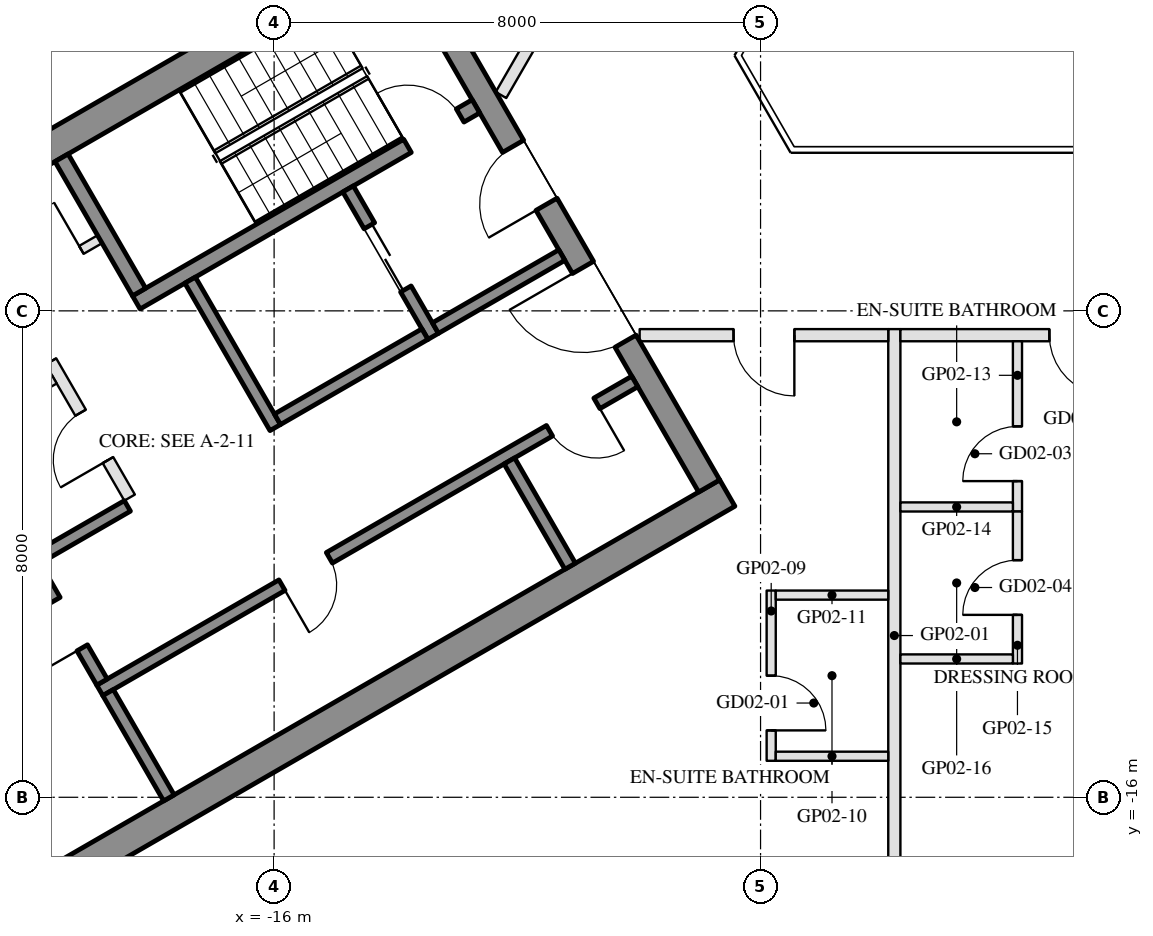
"""IFC4 building model, lengths in metres.
Left out: names, types, materials, properties, quantities, classifications, styles, units other than length and angle.
Written with IfcOpenShell. Run it as: python <this file> out.ifc"""

import sys

from ifc_helpers import new_model, si_unit, direction, frame, frame_2d, origin, place, context, subcontext, project, spatial, rectangle, extrude, element, fill, save


model = new_model("IFC4")
c1 = context("Model", 3, precision=1e-05, world=origin(), true_north=direction((0.0, 1.0)))
c2 = subcontext(c1, "Body", "Model", "MODEL_VIEW")
j1 = project(units=[si_unit("LENGTHUNIT", "METRE"), si_unit("PLANEANGLEUNIT", "RADIAN")], contexts=[c1])
p1 = place(None, origin())
s1 = spatial("IfcSite", under=j1, at=p1, CompositionType="ELEMENT")
p2 = place(p1, origin())
s2 = spatial("IfcBuilding", under=s1, at=p2, CompositionType="ELEMENT")
p3 = place(p2, frame((0.0, 0.0, 53.9)))
s3 = spatial("IfcBuildingStorey", under=s2, at=p3, CompositionType="ELEMENT", Elevation=53.9)
for number, where, z_axis, x_axis in (
    (1, (-13.797, -1.903, 0.0), (0.0, 0.0, 1.0), (-0.866, -0.5, 0.0)),
    (2, (-8.547, -10.997, 0.0), (0.0, 0.0, 1.0), (-0.866, -0.5, 0.0)),
):
    element("IfcWall", number, at=place(p3, frame(where, z_axis=z_axis, x_axis=x_axis)), inside=s3, PredefinedType="SHEAR", context=c2, shape_type="SweptSolid", body=[
        extrude(rectangle(XDim=14.837, YDim=0.5, at=frame_2d((7.418, 0.0))), origin(), (0.0, 0.0, 1.0), 3.5),
    ])
p4 = place(p3, frame((-13.845, -2.22, 0.0), z_axis=(0.0, 0.0, 1.0), x_axis=(0.500004234368, -0.866022959057, 0.0)))
e3 = element("IfcWall", 3, at=p4, inside=s3, PredefinedType="SHEAR", context=c2, shape_type="SweptSolid", body=[
    extrude(rectangle(XDim=10.0, YDim=0.4, at=frame_2d((5.0, 0.0))), origin(), (0.0, 0.0, 1.0), 3.5),
])
p5 = place(p4, frame((3.55, 0.0, 0.0)))
e4 = element("IfcOpeningElement", 4, at=p5, cuts=e3, PredefinedType="OPENING", context=c2, shape_type="SweptSolid", body=[
    extrude(rectangle(XDim=1.1, YDim=2.1, at=frame_2d((0.55, 1.05))), frame((0.0, 0.21, 0.0), z_axis=(0.0, -1.0, 0.0), x_axis=(1.0, 0.0, 0.0)), (0.0, 0.0, 1.0), 0.42),
])
p6 = place(p4, frame((5.85, 0.0, 0.0)))
e5 = element("IfcOpeningElement", 5, at=p6, cuts=e3, PredefinedType="OPENING", context=c2, shape_type="SweptSolid", body=[
    extrude(rectangle(XDim=1.4, YDim=2.1, at=frame_2d((0.7, 1.05))), frame((0.0, 0.21, 0.0), z_axis=(0.0, -1.0, 0.0), x_axis=(1.0, 0.0, 0.0)), (0.0, 0.0, 1.0), 0.42),
])
p7 = place(p3, frame((-12.681, -4.636, 0.0), z_axis=(0.0, 0.0, 1.0), x_axis=(-0.866021702275, -0.500006411147, 0.0)))
e6 = element("IfcWall", 6, at=p7, inside=s3, PredefinedType="SHEAR", context=c2, shape_type="SweptSolid", body=[
    extrude(rectangle(XDim=6.45, YDim=0.25, at=frame_2d((3.225, 0.0))), origin(), (0.0, 0.0, 1.0), 3.5),
])
p8 = place(p7, frame((0.3, 0.0, 0.0)))
e7 = element("IfcOpeningElement", 7, at=p8, cuts=e6, PredefinedType="OPENING", context=c2, shape_type="SweptSolid", body=[
    extrude(rectangle(XDim=1.0, YDim=2.1, at=frame_2d((0.5, 1.05))), frame((0.0, 0.135, 0.0), z_axis=(0.0, -1.0, 0.0), x_axis=(1.0, 0.0, 0.0)), (0.0, 0.0, 1.0), 0.27),
])
p9 = place(p3, frame((-19.496, -5.482, 0.0), z_axis=(0.0, 0.0, 1.0), x_axis=(0.499990435942, -0.866030925526, 0.0)))
e8 = element("IfcWall", 8, at=p9, inside=s3, PredefinedType="SHEAR", context=c2, shape_type="SweptSolid", body=[
    extrude(rectangle(XDim=2.55, YDim=0.25, at=frame_2d((1.275, 0.0))), origin(), (0.0, 0.0, 1.0), 3.5),
])
p10 = place(p3, frame((-17.381, -7.495, 0.0), z_axis=(0.0, 0.0, 1.0), x_axis=(0.500011755427, -0.866018616679, 0.0)))
e9 = element("IfcWall", 9, at=p10, inside=s3, PredefinedType="SHEAR", context=c2, shape_type="SweptSolid", body=[
    extrude(rectangle(XDim=2.8, YDim=0.2, at=frame_2d((1.4, 0.0))), origin(), (0.0, 0.0, 1.0), 3.5),
])
p11 = place(p3, frame((-14.783, -5.995, 0.0), z_axis=(0.0, 0.0, 1.0), x_axis=(0.49994636267, -0.866056369097, 0.0)))
e10 = element("IfcWall", 10, at=p11, inside=s3, PredefinedType="SHEAR", context=c2, shape_type="SweptSolid", body=[
    extrude(rectangle(XDim=2.8, YDim=0.2, at=frame_2d((1.4, 0.0))), origin(), (0.0, 0.0, 1.0), 3.5),
])
p12 = place(p11, frame((0.7, 0.0, 0.0)))
e11 = element("IfcOpeningElement", 11, at=p12, cuts=e10, PredefinedType="OPENING", context=c2, shape_type="SweptSolid", body=[
    extrude(rectangle(XDim=1.2, YDim=2.1, at=frame_2d((0.6, 1.05))), frame((0.0, 0.11, 0.0), z_axis=(0.0, -1.0, 0.0), x_axis=(1.0, 0.0, 0.0)), (0.0, 0.0, 1.0), 0.22),
])
p13 = place(p3, frame((-13.52, -8.383, 0.0), z_axis=(0.0, 0.0, 1.0), x_axis=(-0.866034573852, -0.49998411664, 0.0)))
e12 = element("IfcWall", 12, at=p13, inside=s3, PredefinedType="SHEAR", context=c2, shape_type="SweptSolid", body=[
    extrude(rectangle(XDim=2.8, YDim=0.2, at=frame_2d((1.4, 0.0))), origin(), (0.0, 0.0, 1.0), 3.5),
])
p14 = place(p3, frame((-11.268, -7.083, 0.0), z_axis=(0.0, 0.0, 1.0), x_axis=(-0.866050077142, -0.499957262057, 0.0)))
e13 = element("IfcWall", 13, at=p14, inside=s3, PredefinedType="SHEAR", context=c2, shape_type="SweptSolid", body=[
    extrude(rectangle(XDim=2.4, YDim=0.2, at=frame_2d((1.2, 0.0))), origin(), (0.0, 0.0, 1.0), 3.5),
])
p15 = place(p3, frame((-10.068, -9.162, 0.0), z_axis=(0.0, 0.0, 1.0), x_axis=(-0.866032725843, -0.499987317609, 0.0)))
e14 = element("IfcWall", 14, at=p15, inside=s3, PredefinedType="SHEAR", context=c2, shape_type="SweptSolid", body=[
    extrude(rectangle(XDim=10.16, YDim=0.2, at=frame_2d((5.08, 0.0))), origin(), (0.0, 0.0, 1.0), 3.5),
])
p16 = place(p15, frame((0.72, 0.0, 0.0)))
e15 = element("IfcOpeningElement", 15, at=p16, cuts=e14, PredefinedType="OPENING", context=c2, shape_type="SweptSolid", body=[
    extrude(rectangle(XDim=0.9, YDim=2.1, at=frame_2d((0.45, 1.05))), frame((0.0, 0.11, 0.0), z_axis=(0.0, -1.0, 0.0), x_axis=(1.0, 0.0, 0.0)), (0.0, 0.0, 1.0), 0.22),
])
p17 = place(p15, frame((5.8, 0.0, 0.0)))
e16 = element("IfcOpeningElement", 16, at=p17, cuts=e14, PredefinedType="OPENING", context=c2, shape_type="SweptSolid", body=[
    extrude(rectangle(XDim=0.9, YDim=2.1, at=frame_2d((0.45, 1.05))), frame((0.0, 0.11, 0.0), z_axis=(0.0, -1.0, 0.0), x_axis=(1.0, 0.0, 0.0)), (0.0, 0.0, 1.0), 0.22),
])
p18 = place(p3, frame((-20.031, -12.026, 0.0), z_axis=(0.0, 0.0, 1.0), x_axis=(0.500033551112, -0.866006032174, 0.0)))
e17 = element("IfcWall", 17, at=p18, inside=s3, PredefinedType="SHEAR", context=c2, shape_type="SweptSolid", body=[
    extrude(rectangle(XDim=2.4, YDim=0.2, at=frame_2d((1.2, 0.0))), origin(), (0.0, 0.0, 1.0), 3.5),
])
p19 = place(p18, frame((0.85, 0.0, 0.0)))
e18 = element("IfcOpeningElement", 18, at=p19, cuts=e17, PredefinedType="OPENING", context=c2, shape_type="SweptSolid", body=[
    extrude(rectangle(XDim=0.9, YDim=2.1, at=frame_2d((0.45, 1.05))), frame((0.0, 0.11, 0.0), z_axis=(0.0, -1.0, 0.0), x_axis=(1.0, 0.0, 0.0)), (0.0, 0.0, 1.0), 0.22),
])
p20 = place(p3, frame((-18.413, -11.208, 0.0), z_axis=(0.0, 0.0, 1.0), x_axis=(-0.866038183914, -0.499977863513, 0.0)))
e19 = element("IfcWall", 19, at=p20, inside=s3, PredefinedType="SHEAR", context=c2, shape_type="SweptSolid", body=[
    extrude(rectangle(XDim=1.71, YDim=0.2, at=frame_2d((0.855, 0.0))), origin(), (0.0, 0.0, 1.0), 3.5),
])
for number, where, z_axis, x_axis in (
    (20, (-12.131, -10.468, 0.0), (0.0, 0.0, 1.0), (0.5, -0.866, 0.0)),
    (21, (-18.73, -14.278, 0.0), (0.0, 0.0, 1.0), (0.5, -0.866, 0.0)),
):
    element("IfcWall", number, at=place(p3, frame(where, z_axis=z_axis, x_axis=x_axis)), inside=s3, PredefinedType="SHEAR", context=c2, shape_type="SweptSolid", body=[
        extrude(rectangle(XDim=2.0, YDim=0.2, at=frame_2d((1.0, 0.0))), origin(), (0.0, 0.0, 1.0), 3.5),
    ])
p21 = place(p3, frame((-21.076, -6.395, 0.0), z_axis=(0.0, 0.0, 1.0), x_axis=(0.50001468107, -0.866016927499, 0.0)))
e22 = element("IfcWall", 22, at=p21, inside=s3, PredefinedType="PARTITIONING", context=c2, shape_type="SweptSolid", body=[
    extrude(rectangle(XDim=5.4, YDim=0.2, at=frame_2d((2.7, 0.0))), origin(), (0.0, 0.0, 1.0), 3.5),
])
p22 = place(p21, frame((1.913, 0.0, 0.0)))
e23 = element("IfcOpeningElement", 23, at=p22, cuts=e22, PredefinedType="OPENING", context=c2, shape_type="SweptSolid", body=[
    extrude(rectangle(XDim=0.9, YDim=2.1, at=frame_2d((0.45, 1.05))), frame((0.0, 0.11, 0.0), z_axis=(0.0, -1.0, 0.0), x_axis=(1.0, 0.0, 0.0)), (0.0, 0.0, 1.0), 0.22),
])
p23 = place(p21, frame((3.788, 0.0, 0.0)))
e24 = element("IfcOpeningElement", 24, at=p23, cuts=e22, PredefinedType="OPENING", context=c2, shape_type="SweptSolid", body=[
    extrude(rectangle(XDim=0.9, YDim=2.1, at=frame_2d((0.45, 1.05))), frame((0.0, 0.11, 0.0), z_axis=(0.0, -1.0, 0.0), x_axis=(1.0, 0.0, 0.0)), (0.0, 0.0, 1.0), 0.22),
])
p24 = place(p3, frame((-18.866, -6.822, 0.0), z_axis=(0.0, 0.0, 1.0), x_axis=(-0.866028054938, -0.499995408039, 0.0)))
e25 = element("IfcWall", 25, at=p24, inside=s3, PredefinedType="PARTITIONING", context=c2, shape_type="SweptSolid", body=[
    extrude(rectangle(XDim=1.6, YDim=0.15, at=frame_2d((0.8, 0.0))), origin(), (0.0, 0.0, 1.0), 3.5),
])
p25 = place(p24, frame((0.35, 0.0, 0.0)))
e26 = element("IfcOpeningElement", 26, at=p25, cuts=e25, PredefinedType="OPENING", context=c2, shape_type="SweptSolid", body=[
    extrude(rectangle(XDim=0.9, YDim=2.1, at=frame_2d((0.45, 1.05))), frame((0.0, 0.085, 0.0), z_axis=(0.0, -1.0, 0.0), x_axis=(1.0, 0.0, 0.0)), (0.0, 0.0, 1.0), 0.17),
])
p26 = place(p3, frame((-19.613, -9.13, 0.0), z_axis=(0.0, 0.0, 1.0), x_axis=(-0.866031734426, -0.499989034847, 0.0)))
e27 = element("IfcWall", 27, at=p26, inside=s3, PredefinedType="PARTITIONING", context=c2, shape_type="SweptSolid", body=[
    extrude(rectangle(XDim=6.95, YDim=0.15, at=frame_2d((3.475, 0.0))), origin(), (0.0, 0.0, 1.0), 3.5),
])
p27 = place(p3, frame((-5.8, -18.38, 0.0), z_axis=(0.0, 0.0, 1.0), x_axis=(0.0, 1.0, 0.0)))
e28 = element("IfcWall", 28, at=p27, inside=s3, PredefinedType="PARTITIONING", context=c2, shape_type="SweptSolid", body=[
    extrude(rectangle(XDim=10.08, YDim=0.2, at=frame_2d((5.04, 0.0))), origin(), (0.0, 0.0, 1.0), 2.96),
])
p28 = place(p3, frame((-5.9, -8.4, 0.0), z_axis=(0.0, 0.0, 1.0), x_axis=(-1.0, 0.0, 0.0)))
e29 = element("IfcWall", 29, at=p28, inside=s3, PredefinedType="PARTITIONING", context=c2, shape_type="SweptSolid", body=[
    extrude(rectangle(XDim=4.088, YDim=0.2, at=frame_2d((2.044, 0.0))), origin(), (0.0, 0.0, 1.0), 2.95),
])
p29 = place(p28, frame((1.544, 0.0, 0.0)))
e30 = element("IfcOpeningElement", 30, at=p29, cuts=e29, PredefinedType="OPENING", context=c2, shape_type="SweptSolid", body=[
    extrude(rectangle(XDim=1.0, YDim=2.1, at=frame_2d((0.5, 1.05))), frame((0.0, 0.11, 0.0), z_axis=(0.0, -1.0, 0.0), x_axis=(1.0, 0.0, 0.0)), (0.0, 0.0, 1.0), 0.22),
])
p30 = place(p3, frame((-7.825, -12.6, 0.0), z_axis=(0.0, 0.0, 1.0), x_axis=(0.0, -1.0, 0.0)))
e31 = element("IfcWall", 31, at=p30, inside=s3, PredefinedType="PARTITIONING", context=c2, shape_type="SweptSolid", body=[
    extrude(rectangle(XDim=2.8, YDim=0.15, at=frame_2d((1.4, 0.0))), origin(), (0.0, 0.0, 1.0), 2.95),
])
p31 = place(p30, frame((1.4, 0.0, 0.0)))
e32 = element("IfcOpeningElement", 32, at=p31, cuts=e31, PredefinedType="OPENING", context=c2, shape_type="SweptSolid", body=[
    extrude(rectangle(XDim=0.9, YDim=2.1, at=frame_2d((0.45, 1.05))), frame((0.0, 0.085, 0.0), z_axis=(0.0, -1.0, 0.0), x_axis=(1.0, 0.0, 0.0)), (0.0, 0.0, 1.0), 0.17),
])
for number, where, z_axis, x_axis in (
    (33, (-7.75, -15.325, 0.0), (0.0, 0.0, 1.0), (1.0, 0.0, 0.0)),
    (34, (-7.75, -12.675, 0.0), (0.0, 0.0, 1.0), (1.0, 0.0, 0.0)),
):
    element("IfcWall", number, at=place(p3, frame(where, z_axis=z_axis, x_axis=x_axis)), inside=s3, PredefinedType="PARTITIONING", context=c2, shape_type="SweptSolid", body=[
        extrude(rectangle(XDim=1.85, YDim=0.15, at=frame_2d((0.925, 0.0))), origin(), (0.0, 0.0, 1.0), 3.55),
    ])
p32 = place(p3, frame((2.8, -8.4, 0.0), z_axis=(0.0, 0.0, 1.0), x_axis=(-1.0, 0.0, 0.0)))
e35 = element("IfcWall", 35, at=p32, inside=s3, PredefinedType="PARTITIONING", context=c2, shape_type="SweptSolid", body=[
    extrude(rectangle(XDim=8.5, YDim=0.2, at=frame_2d((4.25, 0.0))), origin(), (0.0, 0.0, 1.0), 2.95),
])
p33 = place(p32, frame((5.05, 0.0, 0.0)))
e36 = element("IfcOpeningElement", 36, at=p33, cuts=e35, PredefinedType="OPENING", context=c2, shape_type="SweptSolid", body=[
    extrude(rectangle(XDim=1.0, YDim=2.1, at=frame_2d((0.5, 1.05))), frame((0.0, 0.11, 0.0), z_axis=(0.0, -1.0, 0.0), x_axis=(1.0, 0.0, 0.0)), (0.0, 0.0, 1.0), 0.22),
])
p34 = place(p3, frame((-3.775, -11.3, 0.0), z_axis=(0.0, 0.0, 1.0), x_axis=(0.0, 1.0, 0.0)))
e37 = element("IfcWall", 37, at=p34, inside=s3, PredefinedType="PARTITIONING", context=c2, shape_type="SweptSolid", body=[
    extrude(rectangle(XDim=2.8, YDim=0.15, at=frame_2d((1.4, 0.0))), origin(), (0.0, 0.0, 1.0), 2.95),
])
p35 = place(p34, frame((0.5, 0.0, 0.0)))
e38 = element("IfcOpeningElement", 38, at=p35, cuts=e37, PredefinedType="OPENING", context=c2, shape_type="SweptSolid", body=[
    extrude(rectangle(XDim=0.9, YDim=2.1, at=frame_2d((0.45, 1.05))), frame((0.0, 0.085, 0.0), z_axis=(0.0, -1.0, 0.0), x_axis=(1.0, 0.0, 0.0)), (0.0, 0.0, 1.0), 0.17),
])
p36 = place(p3, frame((-5.7, -11.225, 0.0), z_axis=(0.0, 0.0, 1.0), x_axis=(1.0, 0.0, 0.0)))
e39 = element("IfcWall", 39, at=p36, inside=s3, PredefinedType="PARTITIONING", context=c2, shape_type="SweptSolid", body=[
    extrude(rectangle(XDim=1.85, YDim=0.15, at=frame_2d((0.925, 0.0))), origin(), (0.0, 0.0, 1.0), 2.95),
])
p37 = place(p3, frame((-3.775, -13.8, 0.0), z_axis=(0.0, 0.0, 1.0), x_axis=(0.0, 1.0, 0.0)))
e40 = element("IfcWall", 40, at=p37, inside=s3, PredefinedType="PARTITIONING", context=c2, shape_type="SweptSolid", body=[
    extrude(rectangle(XDim=2.5, YDim=0.15, at=frame_2d((1.25, 0.0))), origin(), (0.0, 0.0, 1.0), 2.95),
])
p38 = place(p37, frame((0.8, 0.0, 0.0)))
e41 = element("IfcOpeningElement", 41, at=p38, cuts=e40, PredefinedType="OPENING", context=c2, shape_type="SweptSolid", body=[
    extrude(rectangle(XDim=0.9, YDim=2.1, at=frame_2d((0.45, 1.05))), frame((0.0, 0.085, 0.0), z_axis=(0.0, -1.0, 0.0), x_axis=(1.0, 0.0, 0.0)), (0.0, 0.0, 1.0), 0.17),
])
p39 = place(p3, frame((-5.7, -13.725, 0.0), z_axis=(0.0, 0.0, 1.0), x_axis=(1.0, 0.0, 0.0)))
e42 = element("IfcWall", 42, at=p39, inside=s3, PredefinedType="PARTITIONING", context=c2, shape_type="SweptSolid", body=[
    extrude(rectangle(XDim=1.85, YDim=0.15, at=frame_2d((0.925, 0.0))), origin(), (0.0, 0.0, 1.0), 2.95),
])
p40 = place(p3, frame((-12.269, -4.45, 0.0), z_axis=(0.0, 0.0, 1.0), x_axis=(0.500021044785, 0.866013253231, 0.0)))
e43 = element("IfcWall", 43, at=p40, inside=s3, PredefinedType="PARTITIONING", context=c2, shape_type="SweptSolid", body=[
    extrude(rectangle(XDim=4.884, YDim=0.2, at=frame_2d((2.442, 0.0))), origin(), (0.0, 0.0, 1.0), 2.95),
])
p41 = place(p40, frame((1.942, 0.0, 0.0)))
e44 = element("IfcOpeningElement", 44, at=p41, cuts=e43, PredefinedType="OPENING", context=c2, shape_type="SweptSolid", body=[
    extrude(rectangle(XDim=1.0, YDim=2.1, at=frame_2d((0.5, 1.05))), frame((0.0, 0.11, 0.0), z_axis=(0.0, -1.0, 0.0), x_axis=(1.0, 0.0, 0.0)), (0.0, 0.0, 1.0), 0.22),
])
p42 = place(p12, origin())
e45 = element("IfcDoor", 45, at=p42, inside=s3, OperationType="DOUBLE_DOOR_SLIDING", PredefinedType="DOOR", context=c2, shape_type="SweptSolid", body=[
    extrude(rectangle(XDim=1.2, YDim=2.1, at=frame_2d((0.6, 1.05))), frame((0.0, 0.025, 0.0), z_axis=(0.0, -1.0, 0.0), x_axis=(1.0, 0.0, 0.0)), (0.0, 0.0, 1.0), 0.05),
])
fill(e11, e45)
p43 = place(p25, frame((0.9, 0.0, 0.0), z_axis=(0.0, 0.0, 1.0), x_axis=(-1.0, 0.0, 0.0)))
e46 = element("IfcDoor", 46, at=p43, inside=s3, OperationType="SINGLE_SWING_RIGHT", PredefinedType="DOOR", context=c2, shape_type="SweptSolid", body=[
    extrude(rectangle(XDim=0.9, YDim=2.1, at=frame_2d((0.45, 1.05))), frame((0.0, 0.025, 0.0), z_axis=(0.0, -1.0, 0.0), x_axis=(1.0, 0.0, 0.0)), (0.0, 0.0, 1.0), 0.05),
])
fill(e26, e46)
p44 = place(p16, origin())
e47 = element("IfcDoor", 47, at=p44, inside=s3, OperationType="SINGLE_SWING_LEFT", PredefinedType="DOOR", context=c2, shape_type="SweptSolid", body=[
    extrude(rectangle(XDim=0.9, YDim=2.1, at=frame_2d((0.45, 1.05))), frame((0.0, 0.025, 0.0), z_axis=(0.0, -1.0, 0.0), x_axis=(1.0, 0.0, 0.0)), (0.0, 0.0, 1.0), 0.05),
])
fill(e15, e47)
p45 = place(p17, origin())
e48 = element("IfcDoor", 48, at=p45, inside=s3, OperationType="SINGLE_SWING_RIGHT", PredefinedType="DOOR", context=c2, shape_type="SweptSolid", body=[
    extrude(rectangle(XDim=0.9, YDim=2.1, at=frame_2d((0.45, 1.05))), frame((0.0, 0.025, 0.0), z_axis=(0.0, -1.0, 0.0), x_axis=(1.0, 0.0, 0.0)), (0.0, 0.0, 1.0), 0.05),
])
fill(e16, e48)
p46 = place(p19, frame((0.9, 0.0, 0.0), z_axis=(0.0, 0.0, 1.0), x_axis=(-1.0, 0.0, 0.0)))
e49 = element("IfcDoor", 49, at=p46, inside=s3, OperationType="SINGLE_SWING_LEFT", PredefinedType="DOOR", context=c2, shape_type="SweptSolid", body=[
    extrude(rectangle(XDim=0.9, YDim=2.1, at=frame_2d((0.45, 1.05))), frame((0.0, 0.025, 0.0), z_axis=(0.0, -1.0, 0.0), x_axis=(1.0, 0.0, 0.0)), (0.0, 0.0, 1.0), 0.05),
])
fill(e18, e49)
p47 = place(p23, frame((0.9, 0.0, 0.0), z_axis=(0.0, 0.0, 1.0), x_axis=(-1.0, 0.0, 0.0)))
e50 = element("IfcDoor", 50, at=p47, inside=s3, OperationType="SINGLE_SWING_LEFT", PredefinedType="DOOR", context=c2, shape_type="SweptSolid", body=[
    extrude(rectangle(XDim=0.9, YDim=2.1, at=frame_2d((0.45, 1.05))), frame((0.0, 0.025, 0.0), z_axis=(0.0, -1.0, 0.0), x_axis=(1.0, 0.0, 0.0)), (0.0, 0.0, 1.0), 0.05),
])
fill(e24, e50)
p48 = place(p5, frame((1.1, 0.0, 0.0), z_axis=(0.0, 0.0, 1.0), x_axis=(-1.0, 0.0, 0.0)))
e51 = element("IfcDoor", 51, at=p48, inside=s3, OperationType="SINGLE_SWING_LEFT", PredefinedType="DOOR", context=c2, shape_type="SweptSolid", body=[
    extrude(rectangle(XDim=1.1, YDim=2.1, at=frame_2d((0.55, 1.05))), frame((0.0, 0.025, 0.0), z_axis=(0.0, -1.0, 0.0), x_axis=(1.0, 0.0, 0.0)), (0.0, 0.0, 1.0), 0.05),
])
fill(e4, e51)
p49 = place(p6, frame((1.4, 0.0, 0.0), z_axis=(0.0, 0.0, 1.0), x_axis=(-1.0, 0.0, 0.0)))
e52 = element("IfcDoor", 52, at=p49, inside=s3, OperationType="DOUBLE_DOOR_SINGLE_SWING", PredefinedType="DOOR", context=c2, shape_type="SweptSolid", body=[
    extrude(rectangle(XDim=1.4, YDim=2.1, at=frame_2d((0.7, 1.05))), frame((0.0, 0.025, 0.0), z_axis=(0.0, -1.0, 0.0), x_axis=(1.0, 0.0, 0.0)), (0.0, 0.0, 1.0), 0.05),
])
fill(e5, e52)
p50 = place(p8, frame((1.0, 0.0, 0.0), z_axis=(0.0, 0.0, 1.0), x_axis=(-1.0, 0.0, 0.0)))
e53 = element("IfcDoor", 53, at=p50, inside=s3, OperationType="SINGLE_SWING_LEFT", PredefinedType="DOOR", context=c2, shape_type="SweptSolid", body=[
    extrude(rectangle(XDim=1.0, YDim=2.1, at=frame_2d((0.5, 1.05))), frame((0.0, 0.025, 0.0), z_axis=(0.0, -1.0, 0.0), x_axis=(1.0, 0.0, 0.0)), (0.0, 0.0, 1.0), 0.05),
])
fill(e7, e53)
p51 = place(p31, origin())
e54 = element("IfcDoor", 54, at=p51, inside=s3, OperationType="SINGLE_SWING_RIGHT", PredefinedType="DOOR", context=c2, shape_type="SweptSolid", body=[
    extrude(rectangle(XDim=0.9, YDim=2.1, at=frame_2d((0.45, 1.05))), frame((0.0, 0.025, 0.0), z_axis=(0.0, -1.0, 0.0), x_axis=(1.0, 0.0, 0.0)), (0.0, 0.0, 1.0), 0.05),
])
fill(e32, e54)
p52 = place(p29, origin())
e55 = element("IfcDoor", 55, at=p52, inside=s3, OperationType="SINGLE_SWING_LEFT", PredefinedType="DOOR", context=c2, shape_type="SweptSolid", body=[
    extrude(rectangle(XDim=1.0, YDim=2.1, at=frame_2d((0.5, 1.05))), frame((0.0, 0.025, 0.0), z_axis=(0.0, -1.0, 0.0), x_axis=(1.0, 0.0, 0.0)), (0.0, 0.0, 1.0), 0.05),
])
fill(e30, e55)
p53 = place(p35, origin())
e56 = element("IfcDoor", 56, at=p53, inside=s3, OperationType="SINGLE_SWING_LEFT", PredefinedType="DOOR", context=c2, shape_type="SweptSolid", body=[
    extrude(rectangle(XDim=0.9, YDim=2.1, at=frame_2d((0.45, 1.05))), frame((0.0, 0.025, 0.0), z_axis=(0.0, -1.0, 0.0), x_axis=(1.0, 0.0, 0.0)), (0.0, 0.0, 1.0), 0.05),
])
fill(e38, e56)
p54 = place(p38, origin())
e57 = element("IfcDoor", 57, at=p54, inside=s3, OperationType="SINGLE_SWING_LEFT", PredefinedType="DOOR", context=c2, shape_type="SweptSolid", body=[
    extrude(rectangle(XDim=0.9, YDim=2.1, at=frame_2d((0.45, 1.05))), frame((0.0, 0.025, 0.0), z_axis=(0.0, -1.0, 0.0), x_axis=(1.0, 0.0, 0.0)), (0.0, 0.0, 1.0), 0.05),
])
fill(e41, e57)
p55 = place(p33, origin())
e58 = element("IfcDoor", 58, at=p55, inside=s3, OperationType="SINGLE_SWING_LEFT", PredefinedType="DOOR", context=c2, shape_type="SweptSolid", body=[
    extrude(rectangle(XDim=1.0, YDim=2.1, at=frame_2d((0.5, 1.05))), frame((0.0, 0.025, 0.0), z_axis=(0.0, -1.0, 0.0), x_axis=(1.0, 0.0, 0.0)), (0.0, 0.0, 1.0), 0.05),
])
fill(e36, e58)
save(model, sys.argv[1])
